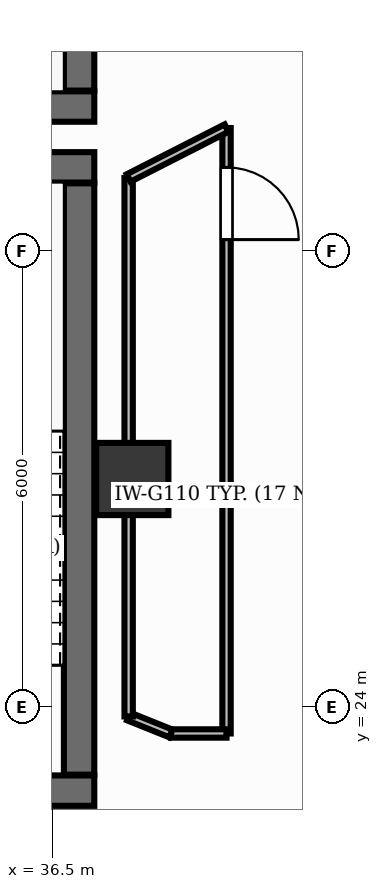
"""IFC4 building model, lengths in metres.
Left out: names, types, materials, properties, quantities, classifications, styles, units other than length and angle.
Written with IfcOpenShell. Run it as: python <this file> out.ifc"""

import sys

from ifc_helpers import new_model, si_unit, direction, frame, frame_2d, origin, origin_2d, place, context, subcontext, project, spatial, rectangle, extrude, element, fill, save


model = new_model("IFC4")
c1 = context("Model", 3, precision=1e-05, world=origin(), true_north=direction((0.0, 1.0)))
c2 = subcontext(c1, "Body", "Model", "MODEL_VIEW")
j1 = project(units=[si_unit("LENGTHUNIT", "METRE"), si_unit("PLANEANGLEUNIT", "RADIAN")], contexts=[c1])
p1 = place(None, origin())
s1 = spatial("IfcSite", under=j1, at=p1, CompositionType="ELEMENT")
p2 = place(p1, origin())
s2 = spatial("IfcBuilding", under=s1, at=p2, CompositionType="ELEMENT")
p3 = place(p2, frame((0.0, 0.0, 256.2)))
s3 = spatial("IfcBuildingStorey", under=s2, at=p3, CompositionType="ELEMENT", Elevation=256.2)
p4 = place(p3, frame((28.4, 31.9, 0.0), z_axis=(0.0, 0.0, 1.0), x_axis=(1.0, 0.0, 0.0)))
e1 = element("IfcWall", 1, at=p4, inside=s3, PredefinedType="SHEAR", context=c2, shape_type="SweptSolid", body=[
    extrude(rectangle(XDim=8.65, YDim=0.4, at=frame_2d((4.325, 0.0))), origin(), (0.0, 0.0, 1.0), 3.9),
])
p5 = place(p3, frame((36.85, 32.11, 0.0), z_axis=(0.0, 0.0, 1.0), x_axis=(0.0, 1.0, 0.0)))
e2 = element("IfcWall", 2, at=p5, inside=s3, PredefinedType="SHEAR", context=c2, shape_type="SweptSolid", body=[
    extrude(rectangle(XDim=3.08, YDim=0.4, at=frame_2d((1.54, 0.0))), origin(), (0.0, 0.0, 1.0), 3.9),
])
for number, where, z_axis, x_axis in (
    (3, (33.15, 31.1, 0.0), (0.0, 0.0, 1.0), (1.0, 0.0, 0.0)),
    (4, (33.15, 22.9, 0.0), (0.0, 0.0, 1.0), (1.0, 0.0, 0.0)),
):
    element("IfcWall", number, at=place(p3, frame(where, z_axis=z_axis, x_axis=x_axis)), inside=s3, PredefinedType="SHEAR", context=c2, shape_type="SweptSolid", body=[
        extrude(rectangle(XDim=3.9, YDim=0.4, at=frame_2d((1.95, 0.0))), origin(), (0.0, 0.0, 1.0), 3.9),
    ])
p6 = place(p3, frame((36.85, 23.11, 0.0), z_axis=(0.0, 0.0, 1.0), x_axis=(0.0, 1.0, 0.0)))
e5 = element("IfcWall", 5, at=p6, inside=s3, PredefinedType="SHEAR", context=c2, shape_type="SweptSolid", body=[
    extrude(rectangle(XDim=7.78, YDim=0.4, at=frame_2d((3.89, 0.0))), origin(), (0.0, 0.0, 1.0), 3.9),
])
p7 = place(p3, frame((37.55, 27.0, -0.0), z_axis=(0.0, 0.0, 1.0), x_axis=(1.0, 0.0, 0.0)))
e6 = element("IfcColumn", 6, at=p7, inside=s3, PredefinedType="PILASTER", context=c2, shape_type="SweptSolid", body=[
    extrude(rectangle(XDim=0.95, YDim=0.95, at=origin_2d()), origin(), (0.0, 0.0, 1.0), 3.901),
])
p8 = place(p3, frame((38.79, 31.617, 0.0), z_axis=(0.0, 0.0, 1.0), x_axis=(0.0, -1.0, 0.0)))
e7 = element("IfcWall", 7, at=p8, inside=s3, PredefinedType="MOVABLE", context=c2, shape_type="SweptSolid", body=[
    extrude(rectangle(XDim=7.965, YDim=0.11, at=frame_2d((3.982, 0.0))), origin(), (0.0, 0.0, 1.0), 2.22),
])
p9 = place(p8, frame((0.517, 0.0, 0.0)))
e8 = element("IfcOpeningElement", 8, at=p9, cuts=e7, PredefinedType="OPENING", context=c2, shape_type="SweptSolid", body=[
    extrude(rectangle(XDim=0.95, YDim=2.15, at=frame_2d((0.475, 1.075))), frame((0.0, 0.07, 0.0), z_axis=(0.0, -1.0, 0.0), x_axis=(1.0, 0.0, 0.0)), (0.0, 0.0, 1.0), 0.14),
])
p10 = place(p3, frame((37.502, 26.921, 0.0), z_axis=(0.0, 0.0, 1.0), x_axis=(0.0, 1.0, 0.0)))
e9 = element("IfcWall", 9, at=p10, inside=s3, PredefinedType="MOVABLE", context=c2, shape_type="SweptSolid", body=[
    extrude(rectangle(XDim=4.04, YDim=0.11, at=frame_2d((2.02, 0.0))), origin(), (0.0, 0.0, 1.0), 2.22),
])
p11 = place(p3, frame((37.502, 30.96, 0.0), z_axis=(0.0, 0.0, 1.0), x_axis=(0.890920886731, 0.454158533539, 0.0)))
e10 = element("IfcWall", 10, at=p11, inside=s3, PredefinedType="MOVABLE", context=c2, shape_type="SweptSolid", body=[
    extrude(rectangle(XDim=1.446, YDim=0.11, at=frame_2d((0.723, 0.0))), origin(), (0.0, 0.0, 1.0), 2.22),
])
p12 = place(p3, frame((38.79, 23.652, 0.0), z_axis=(0.0, 0.0, 1.0), x_axis=(-1.0, 0.0, 0.0)))
e11 = element("IfcWall", 11, at=p12, inside=s3, PredefinedType="MOVABLE", context=c2, shape_type="SweptSolid", body=[
    extrude(rectangle(XDim=0.731, YDim=0.11, at=frame_2d((0.365, 0.0))), origin(), (0.0, 0.0, 1.0), 2.22),
])
p13 = place(p3, frame((38.059, 23.652, 0.0), z_axis=(0.0, 0.0, 1.0), x_axis=(-0.92791427864, 0.372793631243, 0.0)))
e12 = element("IfcWall", 12, at=p13, inside=s3, PredefinedType="MOVABLE", context=c2, shape_type="SweptSolid", body=[
    extrude(rectangle(XDim=0.6, YDim=0.11, at=frame_2d((0.3, 0.0))), origin(), (0.0, 0.0, 1.0), 2.22),
])
p14 = place(p3, frame((37.502, 23.876, 0.0), z_axis=(0.0, 0.0, 1.0), x_axis=(0.0, 1.0, 0.0)))
e13 = element("IfcWall", 13, at=p14, inside=s3, PredefinedType="MOVABLE", context=c2, shape_type="SweptSolid", body=[
    extrude(rectangle(XDim=3.041, YDim=0.11, at=frame_2d((1.52, 0.0))), origin(), (0.0, 0.0, 1.0), 2.22),
])
p15 = place(p9, origin())
e14 = element("IfcDoor", 14, at=p15, inside=s3, OperationType="SINGLE_SWING_RIGHT", PredefinedType="DOOR", context=c2, shape_type="SweptSolid", body=[
    extrude(rectangle(XDim=0.95, YDim=2.15, at=frame_2d((0.475, 1.075))), frame((0.0, 0.025, 0.0), z_axis=(0.0, -1.0, 0.0), x_axis=(1.0, 0.0, 0.0)), (0.0, 0.0, 1.0), 0.05),
])
fill(e8, e14)
save(model, sys.argv[1])
